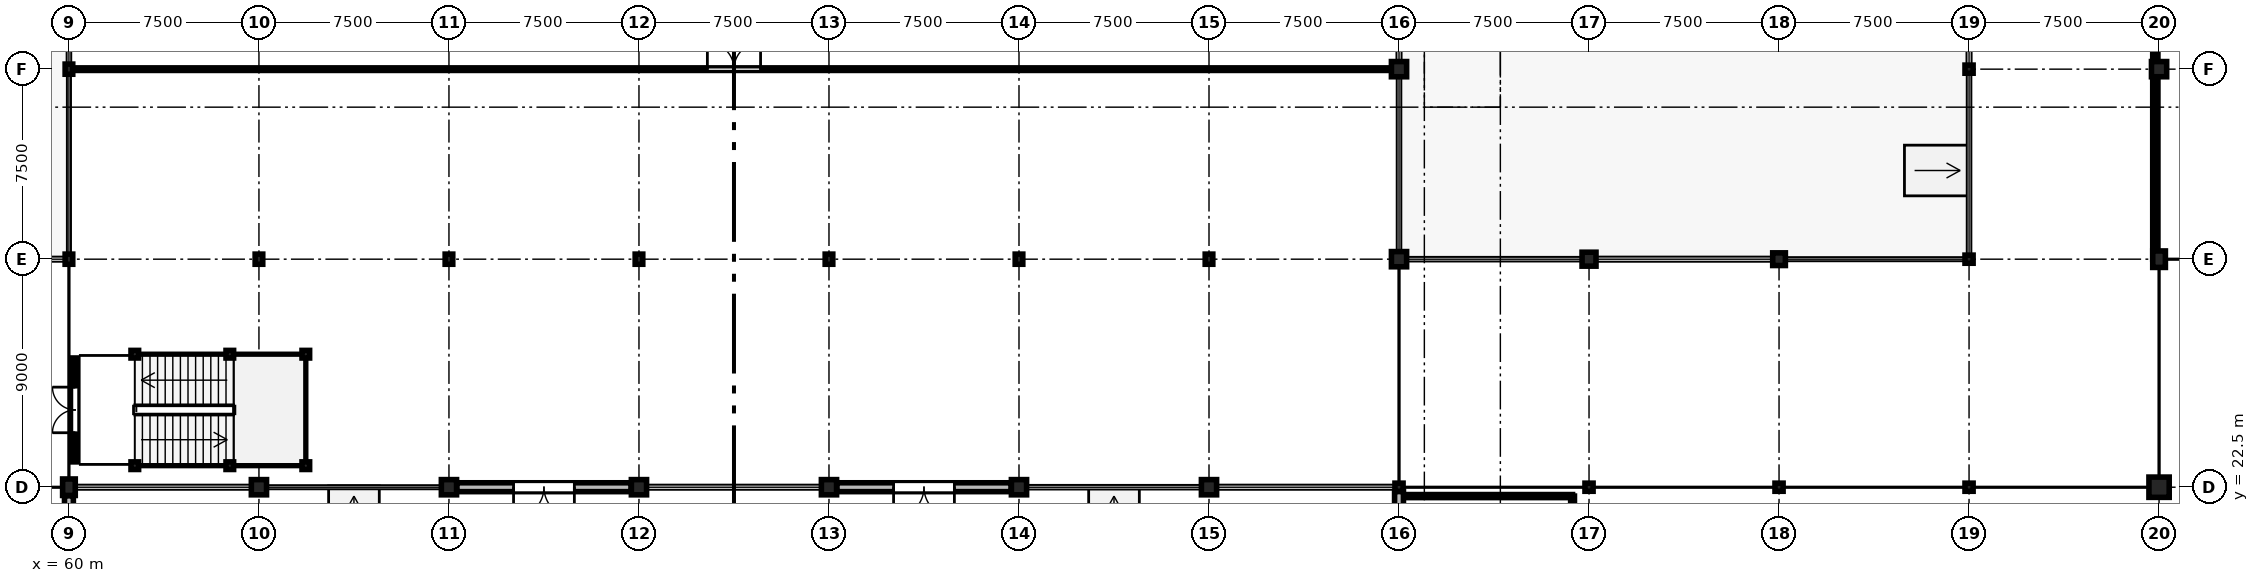
"""IFC4 building model, lengths in metres.
Left out: names, types, materials, properties, quantities, classifications, styles, units other than length and angle.
Written with IfcOpenShell. Run it as: python <this file> out.ifc"""

import sys

from ifc_helpers import new_model, si_unit, direction, frame, frame_2d, origin, origin_2d, place, context, subcontext, project, spatial, rectangle, circle, i_section, extrude, element, fill, save


model = new_model("IFC4")
c1 = context("Model", 3, precision=1e-05, world=origin(), true_north=direction((0.0, 1.0)))
c2 = subcontext(c1, "Body", "Model", "MODEL_VIEW")
j1 = project(units=[si_unit("LENGTHUNIT", "METRE"), si_unit("PLANEANGLEUNIT", "RADIAN")], contexts=[c1])
p1 = place(None, origin())
s1 = spatial("IfcSite", under=j1, at=p1, CompositionType="ELEMENT")
p2 = place(p1, origin())
s2 = spatial("IfcBuilding", under=s1, at=p2, CompositionType="ELEMENT")
p3 = place(p2, origin())
s3 = spatial("IfcBuildingStorey", under=s2, at=p3, CompositionType="ELEMENT", Elevation=0.0)
p4 = place(p3, frame((60.0, 22.5, 0.0), z_axis=(0.0, 0.0, 1.0), x_axis=(1.0, 0.0, 0.0)))
e1 = element("IfcColumn", 1, at=p4, inside=s3, PredefinedType="COLUMN", context=c2, shape_type="SweptSolid", body=[
    extrude(rectangle(XDim=0.5, YDim=0.65, at=origin_2d()), origin(), (0.0, 0.0, 1.0), 4.8),
])
for number, where, z_axis, x_axis in (
    (2, (60.0, 31.5, 0.0), (0.0, 0.0, 1.0), (1.0, 0.0, 0.0)),
    (3, (60.0, 39.0, 0.0), (0.0, 0.0, 1.0), (1.0, 0.0, 0.0)),
):
    element("IfcColumn", number, at=place(p3, frame(where, z_axis=z_axis, x_axis=x_axis)), inside=s3, PredefinedType="COLUMN", context=c2, shape_type="SweptSolid", body=[
        extrude(i_section(OverallWidth=0.3, OverallDepth=0.4, WebThickness=0.013, FlangeThickness=0.024, FilletRadius=0.027, at=origin_2d()), origin(), (0.0, 0.0, 1.0), 4.8),
    ])
p5 = place(p3, frame((67.5, 22.5, 0.0), z_axis=(0.0, 0.0, 1.0), x_axis=(1.0, 0.0, 0.0)))
e4 = element("IfcColumn", 4, at=p5, inside=s3, PredefinedType="COLUMN", context=c2, shape_type="SweptSolid", body=[
    extrude(circle(Radius=0.3, at=origin_2d()), origin(), (0.0, 0.0, 1.0), 4.8),
])
p6 = place(p3, frame((67.5, 31.5, 0.0), z_axis=(0.0, 0.0, 1.0), x_axis=(1.0, 0.0, 0.0)))
e5 = element("IfcColumn", 5, at=p6, inside=s3, PredefinedType="COLUMN", context=c2, shape_type="SweptSolid", body=[
    extrude(i_section(OverallWidth=0.3, OverallDepth=0.4, WebThickness=0.013, FlangeThickness=0.024, FilletRadius=0.027, at=origin_2d()), origin(), (0.0, 0.0, 1.0), 4.8),
])
p7 = place(p3, frame((75.0, 22.5, 0.0), z_axis=(0.0, 0.0, 1.0), x_axis=(1.0, 0.0, 0.0)))
e6 = element("IfcColumn", 6, at=p7, inside=s3, PredefinedType="COLUMN", context=c2, shape_type="SweptSolid", body=[
    extrude(rectangle(XDim=0.6, YDim=0.6, at=origin_2d()), origin(), (0.0, 0.0, 1.0), 4.8),
])
p8 = place(p3, frame((75.0, 31.5, 0.0), z_axis=(0.0, 0.0, 1.0), x_axis=(1.0, 0.0, 0.0)))
e7 = element("IfcColumn", 7, at=p8, inside=s3, PredefinedType="COLUMN", context=c2, shape_type="SweptSolid", body=[
    extrude(i_section(OverallWidth=0.3, OverallDepth=0.4, WebThickness=0.013, FlangeThickness=0.024, FilletRadius=0.027, at=origin_2d()), origin(), (0.0, 0.0, 1.0), 4.8),
])
p9 = place(p3, frame((82.5, 22.5, 0.0), z_axis=(0.0, 0.0, 1.0), x_axis=(1.0, 0.0, 0.0)))
e8 = element("IfcColumn", 8, at=p9, inside=s3, PredefinedType="COLUMN", context=c2, shape_type="SweptSolid", body=[
    extrude(rectangle(XDim=0.6, YDim=0.6, at=origin_2d()), origin(), (0.0, 0.0, 1.0), 4.8),
])
p10 = place(p3, frame((82.5, 31.5, 0.0), z_axis=(0.0, 0.0, 1.0), x_axis=(1.0, 0.0, 0.0)))
e9 = element("IfcColumn", 9, at=p10, inside=s3, PredefinedType="COLUMN", context=c2, shape_type="SweptSolid", body=[
    extrude(i_section(OverallWidth=0.3, OverallDepth=0.4, WebThickness=0.013, FlangeThickness=0.024, FilletRadius=0.027, at=origin_2d()), origin(), (0.0, 0.0, 1.0), 4.8),
])
p11 = place(p3, frame((90.0, 22.5, 0.0), z_axis=(0.0, 0.0, 1.0), x_axis=(1.0, 0.0, 0.0)))
e10 = element("IfcColumn", 10, at=p11, inside=s3, PredefinedType="COLUMN", context=c2, shape_type="SweptSolid", body=[
    extrude(circle(Radius=0.3, at=origin_2d()), origin(), (0.0, 0.0, 1.0), 4.8),
])
p12 = place(p3, frame((90.0, 31.5, 0.0), z_axis=(0.0, 0.0, 1.0), x_axis=(1.0, 0.0, 0.0)))
e11 = element("IfcColumn", 11, at=p12, inside=s3, PredefinedType="COLUMN", context=c2, shape_type="SweptSolid", body=[
    extrude(i_section(OverallWidth=0.3, OverallDepth=0.4, WebThickness=0.013, FlangeThickness=0.024, FilletRadius=0.027, at=origin_2d()), origin(), (0.0, 0.0, 1.0), 4.8),
])
p13 = place(p3, frame((97.5, 22.5, 0.0), z_axis=(0.0, 0.0, 1.0), x_axis=(1.0, 0.0, 0.0)))
e12 = element("IfcColumn", 12, at=p13, inside=s3, PredefinedType="COLUMN", context=c2, shape_type="SweptSolid", body=[
    extrude(rectangle(XDim=0.6, YDim=0.6, at=origin_2d()), origin(), (0.0, 0.0, 1.0), 4.8),
])
p14 = place(p3, frame((97.5, 31.5, 0.0), z_axis=(0.0, 0.0, 1.0), x_axis=(1.0, 0.0, 0.0)))
e13 = element("IfcColumn", 13, at=p14, inside=s3, PredefinedType="COLUMN", context=c2, shape_type="SweptSolid", body=[
    extrude(i_section(OverallWidth=0.3, OverallDepth=0.4, WebThickness=0.013, FlangeThickness=0.024, FilletRadius=0.027, at=origin_2d()), origin(), (0.0, 0.0, 1.0), 4.8),
])
p15 = place(p3, frame((105.0, 22.5, 0.0), z_axis=(0.0, 0.0, 1.0), x_axis=(1.0, 0.0, 0.0)))
e14 = element("IfcColumn", 14, at=p15, inside=s3, PredefinedType="COLUMN", context=c2, shape_type="SweptSolid", body=[
    extrude(rectangle(XDim=0.6, YDim=0.6, at=origin_2d()), origin(), (0.0, 0.0, 1.0), 4.8),
])
p16 = place(p3, frame((105.0, 31.5, 0.0), z_axis=(0.0, 0.0, 1.0), x_axis=(1.0, 0.0, 0.0)))
e15 = element("IfcColumn", 15, at=p16, inside=s3, PredefinedType="COLUMN", context=c2, shape_type="SweptSolid", body=[
    extrude(i_section(OverallWidth=0.3, OverallDepth=0.4, WebThickness=0.013, FlangeThickness=0.024, FilletRadius=0.027, at=origin_2d()), origin(), (0.0, 0.0, 1.0), 4.8),
])
p17 = place(p3, frame((112.5, 22.5, 0.0), z_axis=(0.0, 0.0, 1.0), x_axis=(1.0, 0.0, 0.0)))
e16 = element("IfcColumn", 16, at=p17, inside=s3, PredefinedType="COLUMN", context=c2, shape_type="SweptSolid", body=[
    extrude(rectangle(XDim=0.32, YDim=0.32, at=origin_2d()), origin(), (0.0, 0.0, 1.0), 4.8),
])
for number, where, z_axis, x_axis in (
    (17, (112.5, 31.5, 0.0), (0.0, 0.0, 1.0), (1.0, 0.0, 0.0)),
    (18, (112.5, 39.0, 0.0), (0.0, 0.0, 1.0), (1.0, 0.0, 0.0)),
):
    element("IfcColumn", number, at=place(p3, frame(where, z_axis=z_axis, x_axis=x_axis)), inside=s3, PredefinedType="COLUMN", context=c2, shape_type="SweptSolid", body=[
        extrude(rectangle(XDim=0.6, YDim=0.6, at=origin_2d()), origin(), (0.0, 0.0, 1.0), 4.8),
    ])
p18 = place(p3, frame((120.0, 22.5, 0.0), z_axis=(0.0, 0.0, 1.0), x_axis=(1.0, 0.0, 0.0)))
e19 = element("IfcColumn", 19, at=p18, inside=s3, PredefinedType="COLUMN", context=c2, shape_type="SweptSolid", body=[
    extrude(rectangle(XDim=0.32, YDim=0.32, at=origin_2d()), origin(), (0.0, 0.0, 1.0), 4.8),
])
p19 = place(p3, frame((120.0, 31.5, 0.0), z_axis=(0.0, 0.0, 1.0), x_axis=(1.0, 0.0, 0.0)))
e20 = element("IfcColumn", 20, at=p19, inside=s3, PredefinedType="COLUMN", context=c2, shape_type="SweptSolid", body=[
    extrude(rectangle(XDim=0.55, YDim=0.55, at=origin_2d()), origin(), (0.0, 0.0, 1.0), 4.8),
])
p20 = place(p3, frame((127.5, 22.5, 0.0), z_axis=(0.0, 0.0, 1.0), x_axis=(1.0, 0.0, 0.0)))
e21 = element("IfcColumn", 21, at=p20, inside=s3, PredefinedType="COLUMN", context=c2, shape_type="SweptSolid", body=[
    extrude(rectangle(XDim=0.32, YDim=0.32, at=origin_2d()), origin(), (0.0, 0.0, 1.0), 4.8),
])
p21 = place(p3, frame((127.5, 31.5, 0.0), z_axis=(0.0, 0.0, 1.0), x_axis=(1.0, 0.0, 0.0)))
e22 = element("IfcColumn", 22, at=p21, inside=s3, PredefinedType="COLUMN", context=c2, shape_type="SweptSolid", body=[
    extrude(rectangle(XDim=0.5, YDim=0.5, at=origin_2d()), origin(), (0.0, 0.0, 1.0), 4.8),
])
for number, where, z_axis, x_axis in (
    (23, (135.0, 22.5, 0.0), (0.0, 0.0, 1.0), (1.0, 0.0, 0.0)),
    (24, (135.0, 31.5, 0.0), (0.0, 0.0, 1.0), (1.0, 0.0, 0.0)),
    (25, (135.0, 39.0, 0.0), (0.0, 0.0, 1.0), (1.0, 0.0, 0.0)),
):
    element("IfcColumn", number, at=place(p3, frame(where, z_axis=z_axis, x_axis=x_axis)), inside=s3, PredefinedType="COLUMN", context=c2, shape_type="SweptSolid", body=[
        extrude(rectangle(XDim=0.32, YDim=0.32, at=origin_2d()), origin(), (0.0, 0.0, 1.0), 4.8),
    ])
p22 = place(p3, frame((142.5, 22.5, 0.0), z_axis=(0.0, 0.0, 1.0), x_axis=(1.0, 0.0, 0.0)))
e26 = element("IfcColumn", 26, at=p22, inside=s3, PredefinedType="COLUMN", context=c2, shape_type="SweptSolid", body=[
    extrude(rectangle(XDim=0.8, YDim=0.8, at=origin_2d()), origin(), (0.0, 0.0, 1.0), 4.8),
])
p23 = place(p3, frame((142.5, 31.5, 0.0), z_axis=(0.0, 0.0, 1.0), x_axis=(1.0, 0.0, 0.0)))
e27 = element("IfcColumn", 27, at=p23, inside=s3, PredefinedType="COLUMN", context=c2, shape_type="SweptSolid", body=[
    extrude(rectangle(XDim=0.5, YDim=0.65, at=origin_2d()), origin(), (0.0, 0.0, 1.0), 4.8),
])
p24 = place(p3, frame((142.5, 39.0, 0.0), z_axis=(0.0, 0.0, 1.0), x_axis=(1.0, 0.0, 0.0)))
e28 = element("IfcColumn", 28, at=p24, inside=s3, PredefinedType="COLUMN", context=c2, shape_type="SweptSolid", body=[
    extrude(circle(Radius=0.3, at=origin_2d()), origin(), (0.0, 0.0, 1.0), 4.8),
])
for number, where, z_axis, x_axis in (
    (29, (62.6, 23.35, 0.0), (0.0, 0.0, 1.0), (1.0, 0.0, 0.0)),
    (30, (66.35, 23.35, 0.0), (0.0, 0.0, 1.0), (1.0, 0.0, 0.0)),
    (31, (69.35, 23.35, 0.0), (0.0, 0.0, 1.0), (1.0, 0.0, 0.0)),
    (32, (62.6, 27.75, 0.0), (0.0, 0.0, 1.0), (1.0, 0.0, 0.0)),
    (33, (66.35, 27.75, 0.0), (0.0, 0.0, 1.0), (1.0, 0.0, 0.0)),
    (34, (69.35, 27.75, 0.0), (0.0, 0.0, 1.0), (1.0, 0.0, 0.0)),
):
    element("IfcColumn", number, at=place(p3, frame(where, z_axis=z_axis, x_axis=x_axis)), inside=s3, PredefinedType="COLUMN", context=c2, shape_type="SweptSolid", body=[
        extrude(i_section(OverallWidth=0.3, OverallDepth=0.3, WebThickness=0.011, FlangeThickness=0.019, FilletRadius=0.027, at=origin_2d()), origin(), (0.0, 0.0, 1.0), 4.8),
    ])
p25 = place(p3, frame((60.0, 22.165, 0.0), z_axis=(0.0, 0.0, 1.0), x_axis=(0.0, -1.0, 0.0)))
e35 = element("IfcWall", 35, at=p25, inside=s3, PredefinedType="STANDARD", context=c2, shape_type="SweptSolid", body=[
    extrude(rectangle(XDim=6.78, YDim=0.35, at=frame_2d((3.39, 0.0))), origin(), (0.0, 0.0, 1.0), 3.9),
])
p26 = place(p25, frame((2.49, 0.0, 0.9)))
e36 = element("IfcOpeningElement", 36, at=p26, cuts=e35, PredefinedType="OPENING", context=c2, shape_type="SweptSolid", body=[
    extrude(rectangle(XDim=1.8, YDim=1.95, at=frame_2d((0.9, 0.975))), frame((0.0, 0.185, 0.0), z_axis=(0.0, -1.0, 0.0), x_axis=(1.0, 0.0, 0.0)), (0.0, 0.0, 1.0), 0.37),
])
p27 = place(p3, frame((82.19, 22.5, 0.0), z_axis=(0.0, 0.0, 1.0), x_axis=(-1.0, 0.0, 0.0)))
e37 = element("IfcWall", 37, at=p27, inside=s3, PredefinedType="STANDARD", context=c2, shape_type="SweptSolid", body=[
    extrude(rectangle(XDim=6.88, YDim=0.35, at=frame_2d((3.44, 0.0))), origin(), (0.0, 0.0, 1.0), 3.95),
])
p28 = place(p27, frame((2.24, 0.0, 0.0)))
e38 = element("IfcOpeningElement", 38, at=p28, cuts=e37, PredefinedType="OPENING", context=c2, shape_type="SweptSolid", body=[
    extrude(rectangle(XDim=2.4, YDim=2.7, at=frame_2d((1.2, 1.35))), frame((0.0, 0.185, 0.0), z_axis=(0.0, -1.0, 0.0), x_axis=(1.0, 0.0, 0.0)), (0.0, 0.0, 1.0), 0.37),
])
p29 = place(p3, frame((97.19, 22.5, 0.0), z_axis=(0.0, 0.0, 1.0), x_axis=(-1.0, 0.0, 0.0)))
e39 = element("IfcWall", 39, at=p29, inside=s3, PredefinedType="STANDARD", context=c2, shape_type="SweptSolid", body=[
    extrude(rectangle(XDim=6.88, YDim=0.35, at=frame_2d((3.44, 0.0))), origin(), (0.0, 0.0, 1.0), 3.95),
])
p30 = place(p29, frame((2.24, 0.0, 0.0)))
e40 = element("IfcOpeningElement", 40, at=p30, cuts=e39, PredefinedType="OPENING", context=c2, shape_type="SweptSolid", body=[
    extrude(rectangle(XDim=2.4, YDim=2.7, at=frame_2d((1.2, 1.35))), frame((0.0, 0.185, 0.0), z_axis=(0.0, -1.0, 0.0), x_axis=(1.0, 0.0, 0.0)), (0.0, 0.0, 1.0), 0.37),
])
p31 = place(p3, frame((112.5, 15.335, 0.0), z_axis=(0.0, 0.0, 1.0), x_axis=(0.0, 1.0, 0.0)))
e41 = element("IfcWall", 41, at=p31, inside=s3, PredefinedType="STANDARD", context=c2, shape_type="SweptSolid", body=[
    extrude(rectangle(XDim=6.995, YDim=0.35, at=frame_2d((3.498, 0.0))), origin(), (0.0, 0.0, 1.0), 3.9),
])
p32 = place(p31, frame((2.748, 0.0, 0.9)))
e42 = element("IfcOpeningElement", 42, at=p32, cuts=e41, PredefinedType="OPENING", context=c2, shape_type="SweptSolid", body=[
    extrude(rectangle(XDim=1.5, YDim=2.4, at=frame_2d((0.75, 1.2))), frame((0.0, 0.185, 0.0), z_axis=(0.0, -1.0, 0.0), x_axis=(1.0, 0.0, 0.0)), (0.0, 0.0, 1.0), 0.37),
])
p33 = place(p3, frame((60.25, 23.5, 0.0), z_axis=(0.0, 0.0, 1.0), x_axis=(0.0, 1.0, 0.0)))
e43 = element("IfcWall", 43, at=p33, inside=s3, PredefinedType="STANDARD", context=c2, shape_type="SweptSolid", body=[
    extrude(rectangle(XDim=4.1, YDim=0.2, at=frame_2d((2.05, 0.0))), origin(), (0.0, 0.0, 1.0), 3.785),
])
p34 = place(p33, frame((1.15, 0.0, 0.0)))
e44 = element("IfcOpeningElement", 44, at=p34, cuts=e43, PredefinedType="OPENING", context=c2, shape_type="SweptSolid", body=[
    extrude(rectangle(XDim=1.8, YDim=2.25, at=frame_2d((0.9, 1.125))), frame((0.0, 0.11, 0.0), z_axis=(0.0, -1.0, 0.0), x_axis=(1.0, 0.0, 0.0)), (0.0, 0.0, 1.0), 0.22),
])
p35 = place(p3, frame((60.35, 39.0, 0.0), z_axis=(0.0, 0.0, 1.0), x_axis=(1.0, 0.0, 0.0)))
e45 = element("IfcWall", 45, at=p35, inside=s3, PredefinedType="PARTITIONING", context=c2, shape_type="SweptSolid", body=[
    extrude(rectangle(XDim=51.8, YDim=0.1, at=frame_2d((25.9, 0.0))), origin(), (0.0, 0.0, 1.0), 4.485),
])
p36 = place(p35, frame((24.85, 0.0, 0.0)))
e46 = element("IfcOpeningElement", 46, at=p36, cuts=e45, PredefinedType="OPENING", context=c2, shape_type="SweptSolid", body=[
    extrude(rectangle(XDim=2.1, YDim=2.4, at=frame_2d((1.05, 1.2))), frame((0.0, 0.06, 0.0), z_axis=(0.0, -1.0, 0.0), x_axis=(1.0, 0.0, 0.0)), (0.0, 0.0, 1.0), 0.12),
])
p37 = place(p3, frame((142.3, 31.5, 0.0), z_axis=(0.0, 0.0, 1.0), x_axis=(0.0, 1.0, 0.0)))
e47 = element("IfcWall", 47, at=p37, inside=s3, PredefinedType="PARTITIONING", context=c2, shape_type="SweptSolid", body=[
    extrude(rectangle(XDim=44.65, YDim=0.1, at=frame_2d((22.325, 0.0))), origin(), (0.0, 0.0, 1.0), 3.935),
])
p38 = place(p37, frame((26.11, 0.0, 0.0)))
e48 = element("IfcOpeningElement", 48, at=p38, cuts=e47, PredefinedType="OPENING", context=c2, shape_type="SweptSolid", body=[
    extrude(rectangle(XDim=1.05, YDim=2.2, at=frame_2d((0.525, 1.1))), frame((0.0, 0.06, 0.0), z_axis=(0.0, -1.0, 0.0), x_axis=(1.0, 0.0, 0.0)), (0.0, 0.0, 1.0), 0.12),
])
p39 = place(p3, frame((119.35, 18.5, 0.0), z_axis=(0.0, 0.0, 1.0), x_axis=(0.0, 1.0, 0.0)))
e49 = element("IfcWall", 49, at=p39, inside=s3, PredefinedType="PARTITIONING", context=c2, shape_type="SweptSolid", body=[
    extrude(rectangle(XDim=3.65, YDim=0.15, at=frame_2d((1.825, 0.0))), origin(), (0.0, 0.0, 1.0), 4.485),
])
p40 = place(p3, frame((112.85, 22.15, 0.0), z_axis=(0.0, 0.0, 1.0), x_axis=(1.0, 0.0, 0.0)))
e50 = element("IfcWall", 50, at=p40, inside=s3, PredefinedType="PARTITIONING", context=c2, shape_type="SweptSolid", body=[
    extrude(rectangle(XDim=6.5, YDim=0.12, at=frame_2d((3.25, 0.0))), origin(), (0.0, 0.0, 1.0), 3.885),
])
p41 = place(p28, origin())
e51 = element("IfcDoor", 51, at=p41, inside=s3, OperationType="DOUBLE_DOOR_SINGLE_SWING", PredefinedType="DOOR", context=c2, shape_type="SweptSolid", body=[
    extrude(rectangle(XDim=2.4, YDim=2.7, at=frame_2d((1.2, 1.35))), frame((0.0, 0.025, 0.0), z_axis=(0.0, -1.0, 0.0), x_axis=(1.0, 0.0, 0.0)), (0.0, 0.0, 1.0), 0.05),
])
fill(e38, e51)
p42 = place(p30, origin())
e52 = element("IfcDoor", 52, at=p42, inside=s3, OperationType="DOUBLE_DOOR_SINGLE_SWING", PredefinedType="DOOR", context=c2, shape_type="SweptSolid", body=[
    extrude(rectangle(XDim=2.4, YDim=2.7, at=frame_2d((1.2, 1.35))), frame((0.0, 0.025, 0.0), z_axis=(0.0, -1.0, 0.0), x_axis=(1.0, 0.0, 0.0)), (0.0, 0.0, 1.0), 0.05),
])
fill(e40, e52)
p43 = place(p34, origin())
e53 = element("IfcDoor", 53, at=p43, inside=s3, OperationType="DOUBLE_DOOR_SINGLE_SWING", PredefinedType="DOOR", context=c2, shape_type="SweptSolid", body=[
    extrude(rectangle(XDim=1.8, YDim=2.25, at=frame_2d((0.9, 1.125))), frame((0.0, 0.025, 0.0), z_axis=(0.0, -1.0, 0.0), x_axis=(1.0, 0.0, 0.0)), (0.0, 0.0, 1.0), 0.05),
])
fill(e44, e53)
p44 = place(p36, origin())
e54 = element("IfcDoor", 54, at=p44, inside=s3, OperationType="DOUBLE_DOOR_SINGLE_SWING", PredefinedType="DOOR", context=c2, shape_type="SweptSolid", body=[
    extrude(rectangle(XDim=2.1, YDim=2.4, at=frame_2d((1.05, 1.2))), frame((0.0, 0.025, 0.0), z_axis=(0.0, -1.0, 0.0), x_axis=(1.0, 0.0, 0.0)), (0.0, 0.0, 1.0), 0.05),
])
fill(e46, e54)
save(model, sys.argv[1])
